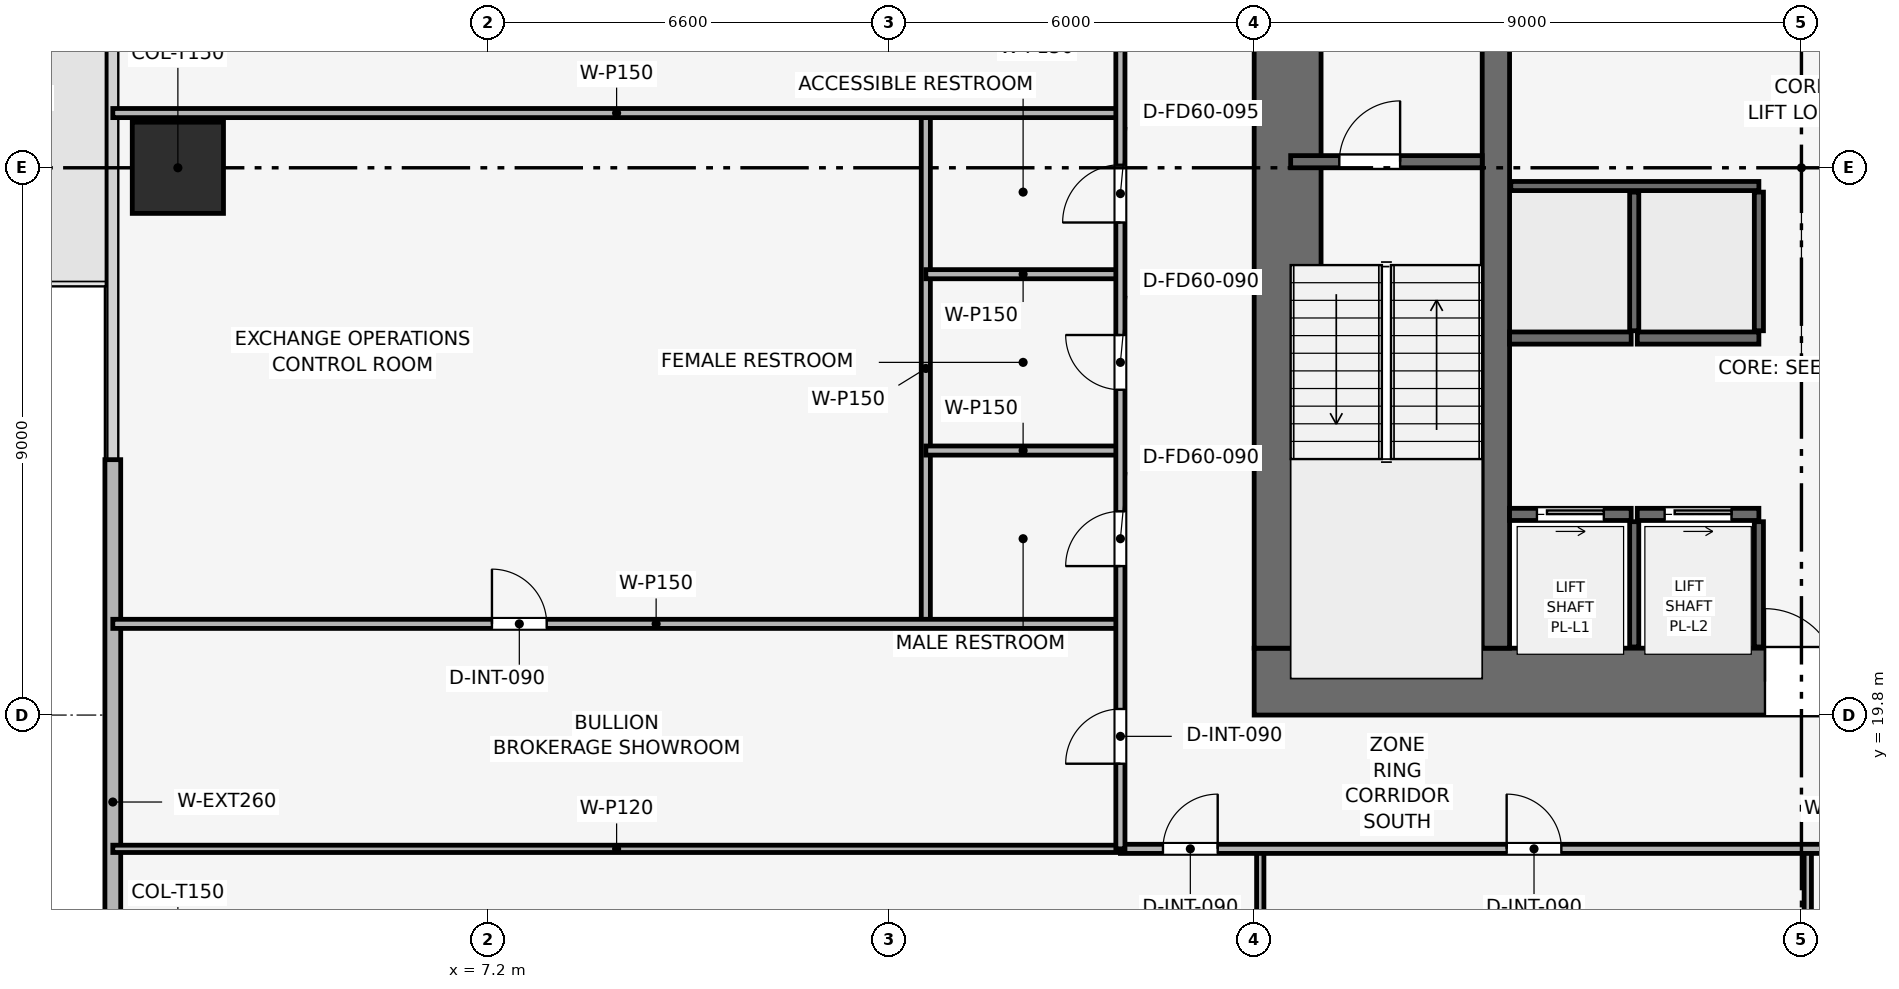
"""IFC4 building model, lengths in metres.
Left out: names, types, materials, properties, quantities, classifications, styles, units other than length and angle.
Written with IfcOpenShell. Run it as: python <this file> out.ifc"""

import sys

from ifc_helpers import new_model, si_unit, direction, frame, frame_2d, origin, origin_2d, place, context, subcontext, project, spatial, rectangle, extrude, element, fill, save


model = new_model("IFC4")
c1 = context("Model", 3, precision=1e-05, world=origin(), true_north=direction((0.0, 1.0)))
c2 = subcontext(c1, "Body", "Model", "MODEL_VIEW")
j1 = project(units=[si_unit("LENGTHUNIT", "METRE"), si_unit("PLANEANGLEUNIT", "RADIAN")], contexts=[c1])
p1 = place(None, origin())
s1 = spatial("IfcSite", under=j1, at=p1, CompositionType="ELEMENT")
p2 = place(p1, origin())
s2 = spatial("IfcBuilding", under=s1, at=p2, CompositionType="ELEMENT")
p3 = place(p2, frame((0.0, 0.0, 76.8)))
s3 = spatial("IfcBuildingStorey", under=s2, at=p3, CompositionType="ELEMENT", Elevation=76.8)
p4 = place(p3, frame((19.8, 20.35, 0.0), z_axis=(0.0, 0.0, 1.0), x_axis=(1.0, 0.0, 0.0)))
e1 = element("IfcWall", 1, at=p4, inside=s3, PredefinedType="SHEAR", context=c2, shape_type="SweptSolid", body=[
    extrude(rectangle(XDim=18.0, YDim=1.1, at=frame_2d((9.0, 0.0))), origin(), (0.0, 0.0, 1.0), 3.9),
])
p5 = place(p4, frame((8.4, 0.0, 0.0)))
e2 = element("IfcOpeningElement", 2, at=p5, cuts=e1, PredefinedType="OPENING", context=c2, shape_type="SweptSolid", body=[
    extrude(rectangle(XDim=1.2, YDim=2.2, at=frame_2d((0.6, 1.1))), frame((0.0, 0.56, 0.0), z_axis=(0.0, -1.0, 0.0), x_axis=(1.0, 0.0, 0.0)), (0.0, 0.0, 1.0), 1.12),
])
p6 = place(p3, frame((20.35, 20.9, 0.0), z_axis=(0.0, 0.0, 1.0), x_axis=(0.0, 1.0, 0.0)))
e3 = element("IfcWall", 3, at=p6, inside=s3, PredefinedType="SHEAR", context=c2, shape_type="SweptSolid", body=[
    extrude(rectangle(XDim=15.8, YDim=1.1, at=frame_2d((7.9, 0.0))), origin(), (0.0, 0.0, 1.0), 3.9),
])
p7 = place(p6, frame((9.9, 0.0, 0.0)))
e4 = element("IfcOpeningElement", 4, at=p7, cuts=e3, PredefinedType="OPENING", context=c2, shape_type="SweptSolid", body=[
    extrude(rectangle(XDim=1.1, YDim=2.15, at=frame_2d((0.55, 1.075))), frame((0.0, 0.56, 0.0), z_axis=(0.0, -1.0, 0.0), x_axis=(1.0, 0.0, 0.0)), (0.0, 0.0, 1.0), 1.12),
])
p8 = place(p3, frame((23.775, 20.9, 0.0), z_axis=(0.0, 0.0, 1.0), x_axis=(0.0, 1.0, 0.0)))
e5 = element("IfcWall", 5, at=p8, inside=s3, PredefinedType="SHEAR", context=c2, shape_type="SweptSolid", body=[
    extrude(rectangle(XDim=15.8, YDim=0.45, at=frame_2d((7.9, 0.0))), origin(), (0.0, 0.0, 1.0), 3.9),
])
p9 = place(p3, frame((2.1, 28.8, 0.003), z_axis=(0.0, 0.0, 1.0), x_axis=(1.0, 0.0, 0.0)))
e6 = element("IfcColumn", 6, at=p9, inside=s3, PredefinedType="COLUMN", context=c2, shape_type="SweptSolid", body=[
    extrude(rectangle(XDim=1.5, YDim=1.5, at=origin_2d()), origin(), (0.0, 0.0, 1.0), 3.644),
])
p10 = place(p3, frame((1.03, 8.7, 0.0), z_axis=(0.0, 0.0, 1.0), x_axis=(0.0, 1.0, 0.0)))
e7 = element("IfcWall", 7, at=p10, inside=s3, PredefinedType="SOLIDWALL", context=c2, shape_type="SweptSolid", body=[
    extrude(rectangle(XDim=15.3, YDim=0.26, at=frame_2d((7.65, 0.0))), origin(), (0.0, 0.0, 1.0), 3.65),
])
p11 = place(p10, frame((0.25, 0.0, 0.9)))
e8 = element("IfcOpeningElement", 8, at=p11, cuts=e7, PredefinedType="OPENING", context=c2, shape_type="SweptSolid", body=[
    extrude(rectangle(XDim=3.8, YDim=1.9, at=frame_2d((1.9, 0.95))), frame((0.0, 0.14, 0.0), z_axis=(0.0, -1.0, 0.0), x_axis=(1.0, 0.0, 0.0)), (0.0, 0.0, 1.0), 0.28),
])
p12 = place(p3, frame((20.4, 28.9, 0.0), z_axis=(0.0, 0.0, 1.0), x_axis=(1.0, 0.0, 0.0)))
e9 = element("IfcWall", 9, at=p12, inside=s3, PredefinedType="SHEAR", context=c2, shape_type="SweptSolid", body=[
    extrude(rectangle(XDim=3.15, YDim=0.2, at=frame_2d((1.575, 0.0))), origin(), (0.0, 0.0, 1.0), 3.65),
])
p13 = place(p12, frame((0.8, 0.0, 0.0)))
e10 = element("IfcOpeningElement", 10, at=p13, cuts=e9, PredefinedType="OPENING", context=c2, shape_type="SweptSolid", body=[
    extrude(rectangle(XDim=1.0, YDim=2.1, at=frame_2d((0.5, 1.05))), frame((0.0, 0.11, 0.0), z_axis=(0.0, -1.0, 0.0), x_axis=(1.0, 0.0, 0.0)), (0.0, 0.0, 1.0), 0.22),
])
p14 = place(p3, frame((24.0, 23.1, 0.0), z_axis=(0.0, 0.0, 1.0), x_axis=(1.0, 0.0, 0.0)))
e11 = element("IfcWall", 11, at=p14, inside=s3, PredefinedType="SHEAR", context=c2, shape_type="SweptSolid", body=[
    extrude(rectangle(XDim=2.0, YDim=0.2, at=frame_2d((1.0, 0.0))), origin(), (0.0, 0.0, 1.0), 3.65),
])
p15 = place(p14, frame((0.45, 0.0, 0.0)))
e12 = element("IfcOpeningElement", 12, at=p15, cuts=e11, PredefinedType="OPENING", context=c2, shape_type="SweptSolid", body=[
    extrude(rectangle(XDim=1.1, YDim=2.15, at=frame_2d((0.55, 1.075))), frame((0.0, 0.11, 0.0), z_axis=(0.0, -1.0, 0.0), x_axis=(1.0, 0.0, 0.0)), (0.0, 0.0, 1.0), 0.22),
])
p16 = place(p3, frame((26.1, 23.1, 0.0), z_axis=(0.0, 0.0, 1.0), x_axis=(1.0, 0.0, 0.0)))
e13 = element("IfcWall", 13, at=p16, inside=s3, PredefinedType="SHEAR", context=c2, shape_type="SweptSolid", body=[
    extrude(rectangle(XDim=2.0, YDim=0.2, at=frame_2d((1.0, 0.0))), origin(), (0.0, 0.0, 1.0), 3.65),
])
p17 = place(p16, frame((0.45, 0.0, 0.0)))
e14 = element("IfcOpeningElement", 14, at=p17, cuts=e13, PredefinedType="OPENING", context=c2, shape_type="SweptSolid", body=[
    extrude(rectangle(XDim=1.1, YDim=2.15, at=frame_2d((0.55, 1.075))), frame((0.0, 0.11, 0.0), z_axis=(0.0, -1.0, 0.0), x_axis=(1.0, 0.0, 0.0)), (0.0, 0.0, 1.0), 0.22),
])
for number, where, z_axis, x_axis in (
    (15, (24.0, 26.0, 0.0), (0.0, 0.0, 1.0), (1.0, 0.0, 0.0)),
    (16, (26.1, 26.0, 0.0), (0.0, 0.0, 1.0), (1.0, 0.0, 0.0)),
):
    element("IfcWall", number, at=place(p3, frame(where, z_axis=z_axis, x_axis=x_axis)), inside=s3, PredefinedType="SHEAR", context=c2, shape_type="SweptSolid", body=[
        extrude(rectangle(XDim=2.0, YDim=0.2, at=frame_2d((1.0, 0.0))), origin(), (0.0, 0.0, 1.0), 3.65),
    ])
for number, where, z_axis, x_axis in (
    (17, (26.05, 20.92, 0.0), (0.0, 0.0, 1.0), (0.0, 1.0, 0.0)),
    (18, (28.1, 20.92, 0.0), (0.0, 0.0, 1.0), (0.0, 1.0, 0.0)),
):
    element("IfcWall", number, at=place(p3, frame(where, z_axis=z_axis, x_axis=x_axis)), inside=s3, PredefinedType="SHEAR", context=c2, shape_type="SweptSolid", body=[
        extrude(rectangle(XDim=2.06, YDim=0.15, at=frame_2d((1.03, 0.0))), origin(), (0.0, 0.0, 1.0), 3.65),
    ])
p18 = place(p3, frame((24.02, 28.5, 0.0), z_axis=(0.0, 0.0, 1.0), x_axis=(1.0, 0.0, 0.0)))
e19 = element("IfcWall", 19, at=p18, inside=s3, PredefinedType="SHEAR", context=c2, shape_type="SweptSolid", body=[
    extrude(rectangle(XDim=4.08, YDim=0.15, at=frame_2d((2.04, 0.0))), origin(), (0.0, 0.0, 1.0), 3.65),
])
for number, where, z_axis, x_axis in (
    (20, (26.05, 26.12, 0.0), (0.0, 0.0, 1.0), (0.0, 1.0, 0.0)),
    (21, (28.1, 26.12, 0.0), (0.0, 0.0, 1.0), (0.0, 1.0, 0.0)),
):
    element("IfcWall", number, at=place(p3, frame(where, z_axis=z_axis, x_axis=x_axis)), inside=s3, PredefinedType="SHEAR", context=c2, shape_type="SweptSolid", body=[
        extrude(rectangle(XDim=2.28, YDim=0.15, at=frame_2d((1.14, 0.0))), origin(), (0.0, 0.0, 1.0), 3.65),
    ])
p19 = place(p3, frame((19.9, 1.03, 0.0), z_axis=(0.0, 0.0, 1.0), x_axis=(0.0, 1.0, 0.0)))
e22 = element("IfcWall", 22, at=p19, inside=s3, PredefinedType="PARTITIONING", context=c2, shape_type="SweptSolid", body=[
    extrude(rectangle(XDim=16.57, YDim=0.12, at=frame_2d((8.285, 0.0))), origin(), (0.0, 0.0, 1.0), 2.935),
])
p20 = place(p3, frame((28.904, 1.03, 0.0), z_axis=(0.0, 0.0, 1.0), x_axis=(0.0, 1.0, 0.0)))
e23 = element("IfcWall", 23, at=p20, inside=s3, PredefinedType="PARTITIONING", context=c2, shape_type="SweptSolid", body=[
    extrude(rectangle(XDim=16.57, YDim=0.12, at=frame_2d((8.285, 0.0))), origin(), (0.0, 0.0, 1.0), 3.085),
])
p21 = place(p3, frame((1.03, 17.6, 0.0), z_axis=(0.0, 0.0, 1.0), x_axis=(1.0, 0.0, 0.0)))
e24 = element("IfcWall", 24, at=p21, inside=s3, PredefinedType="PARTITIONING", context=c2, shape_type="SweptSolid", body=[
    extrude(rectangle(XDim=16.57, YDim=0.12, at=frame_2d((8.285, 0.0))), origin(), (0.0, 0.0, 1.0), 2.935),
])
p22 = place(p3, frame((14.4, 21.3, 0.0), z_axis=(0.0, 0.0, 1.0), x_axis=(0.0, 1.0, 0.0)))
e25 = element("IfcWall", 25, at=p22, inside=s3, PredefinedType="PARTITIONING", context=c2, shape_type="SweptSolid", body=[
    extrude(rectangle(XDim=8.4, YDim=0.15, at=frame_2d((4.2, 0.0))), origin(), (0.0, 0.0, 1.0), 3.085),
])
p23 = place(p3, frame((1.03, 21.3, 0.0), z_axis=(0.0, 0.0, 1.0), x_axis=(1.0, 0.0, 0.0)))
e26 = element("IfcWall", 26, at=p23, inside=s3, PredefinedType="PARTITIONING", context=c2, shape_type="SweptSolid", body=[
    extrude(rectangle(XDim=16.57, YDim=0.15, at=frame_2d((8.285, 0.0))), origin(), (0.0, 0.0, 1.0), 2.935),
])
p24 = place(p23, frame((6.235, 0.0, 0.0)))
e27 = element("IfcOpeningElement", 27, at=p24, cuts=e26, PredefinedType="OPENING", context=c2, shape_type="SweptSolid", body=[
    extrude(rectangle(XDim=0.9, YDim=2.1, at=frame_2d((0.45, 1.05))), frame((0.0, 0.085, 0.0), z_axis=(0.0, -1.0, 0.0), x_axis=(1.0, 0.0, 0.0)), (0.0, 0.0, 1.0), 0.17),
])
p25 = place(p3, frame((1.03, 29.7, 0.0), z_axis=(0.0, 0.0, 1.0), x_axis=(1.0, 0.0, 0.0)))
e28 = element("IfcWall", 28, at=p25, inside=s3, PredefinedType="PARTITIONING", context=c2, shape_type="SweptSolid", body=[
    extrude(rectangle(XDim=16.57, YDim=0.15, at=frame_2d((8.285, 0.0))), origin(), (0.0, 0.0, 1.0), 2.935),
])
for number, where, z_axis, x_axis in (
    (29, (14.4, 24.15, 0.0), (0.0, 0.0, 1.0), (1.0, 0.0, 0.0)),
    (30, (14.4, 27.05, 0.0), (0.0, 0.0, 1.0), (1.0, 0.0, 0.0)),
):
    element("IfcWall", number, at=place(p3, frame(where, z_axis=z_axis, x_axis=x_axis)), inside=s3, PredefinedType="PARTITIONING", context=c2, shape_type="SweptSolid", body=[
        extrude(rectangle(XDim=3.2, YDim=0.15, at=frame_2d((1.6, 0.0))), origin(), (0.0, 0.0, 1.0), 3.65),
    ])
p26 = place(p3, frame((17.6, 17.6, 0.0), z_axis=(0.0, 0.0, 1.0), x_axis=(1.0, 0.0, 0.0)))
e31 = element("IfcWall", 31, at=p26, inside=s3, PredefinedType="PARTITIONING", context=c2, shape_type="SweptSolid", body=[
    extrude(rectangle(XDim=22.4, YDim=0.15, at=frame_2d((11.2, 0.0))), origin(), (0.0, 0.0, 1.0), 3.085),
])
p27 = place(p26, frame((0.7, 0.0, 0.0)))
e32 = element("IfcOpeningElement", 32, at=p27, cuts=e31, PredefinedType="OPENING", context=c2, shape_type="SweptSolid", body=[
    extrude(rectangle(XDim=0.9, YDim=2.1, at=frame_2d((0.45, 1.05))), frame((0.0, 0.085, 0.0), z_axis=(0.0, -1.0, 0.0), x_axis=(1.0, 0.0, 0.0)), (0.0, 0.0, 1.0), 0.17),
])
p28 = place(p26, frame((6.352, 0.0, 0.0)))
e33 = element("IfcOpeningElement", 33, at=p28, cuts=e31, PredefinedType="OPENING", context=c2, shape_type="SweptSolid", body=[
    extrude(rectangle(XDim=0.9, YDim=2.1, at=frame_2d((0.45, 1.05))), frame((0.0, 0.085, 0.0), z_axis=(0.0, -1.0, 0.0), x_axis=(1.0, 0.0, 0.0)), (0.0, 0.0, 1.0), 0.17),
])
p29 = place(p26, frame((16.402, 0.0, 0.0)))
e34 = element("IfcOpeningElement", 34, at=p29, cuts=e31, PredefinedType="OPENING", context=c2, shape_type="SweptSolid", body=[
    extrude(rectangle(XDim=0.9, YDim=2.1, at=frame_2d((0.45, 1.05))), frame((0.0, 0.085, 0.0), z_axis=(0.0, -1.0, 0.0), x_axis=(1.0, 0.0, 0.0)), (0.0, 0.0, 1.0), 0.17),
])
p30 = place(p3, frame((17.6, 17.6, 0.0), z_axis=(0.0, 0.0, 1.0), x_axis=(0.0, 1.0, 0.0)))
e35 = element("IfcWall", 35, at=p30, inside=s3, PredefinedType="PARTITIONING", context=c2, shape_type="SweptSolid", body=[
    extrude(rectangle(XDim=22.4, YDim=0.15, at=frame_2d((11.2, 0.0))), origin(), (0.0, 0.0, 1.0), 3.085),
])
p31 = place(p30, frame((1.4, 0.0, 0.0)))
e36 = element("IfcOpeningElement", 36, at=p31, cuts=e35, PredefinedType="OPENING", context=c2, shape_type="SweptSolid", body=[
    extrude(rectangle(XDim=0.9, YDim=2.1, at=frame_2d((0.45, 1.05))), frame((0.0, 0.085, 0.0), z_axis=(0.0, -1.0, 0.0), x_axis=(1.0, 0.0, 0.0)), (0.0, 0.0, 1.0), 0.17),
])
p32 = place(p30, frame((4.65, 0.0, 0.0)))
e37 = element("IfcOpeningElement", 37, at=p32, cuts=e35, PredefinedType="OPENING", context=c2, shape_type="SweptSolid", body=[
    extrude(rectangle(XDim=0.9, YDim=2.1, at=frame_2d((0.45, 1.05))), frame((0.0, 0.085, 0.0), z_axis=(0.0, -1.0, 0.0), x_axis=(1.0, 0.0, 0.0)), (0.0, 0.0, 1.0), 0.17),
])
p33 = place(p30, frame((7.55, 0.0, 0.0)))
e38 = element("IfcOpeningElement", 38, at=p33, cuts=e35, PredefinedType="OPENING", context=c2, shape_type="SweptSolid", body=[
    extrude(rectangle(XDim=0.9, YDim=2.1, at=frame_2d((0.45, 1.05))), frame((0.0, 0.085, 0.0), z_axis=(0.0, -1.0, 0.0), x_axis=(1.0, 0.0, 0.0)), (0.0, 0.0, 1.0), 0.17),
])
p34 = place(p30, frame((10.3, 0.0, 0.0)))
e39 = element("IfcOpeningElement", 39, at=p34, cuts=e35, PredefinedType="OPENING", context=c2, shape_type="SweptSolid", body=[
    extrude(rectangle(XDim=0.95, YDim=2.1, at=frame_2d((0.475, 1.05))), frame((0.0, 0.085, 0.0), z_axis=(0.0, -1.0, 0.0), x_axis=(1.0, 0.0, 0.0)), (0.0, 0.0, 1.0), 0.17),
])
p35 = place(p30, frame((16.8, 0.0, 0.0)))
e40 = element("IfcOpeningElement", 40, at=p35, cuts=e35, PredefinedType="OPENING", context=c2, shape_type="SweptSolid", body=[
    extrude(rectangle(XDim=0.9, YDim=2.1, at=frame_2d((0.45, 1.05))), frame((0.0, 0.085, 0.0), z_axis=(0.0, -1.0, 0.0), x_axis=(1.0, 0.0, 0.0)), (0.0, 0.0, 1.0), 0.17),
])
p36 = place(p13, origin())
e41 = element("IfcDoor", 41, at=p36, inside=s3, OperationType="SINGLE_SWING_RIGHT", PredefinedType="DOOR", context=c2, shape_type="SweptSolid", body=[
    extrude(rectangle(XDim=1.0, YDim=2.1, at=frame_2d((0.5, 1.05))), frame((0.0, 0.025, 0.0), z_axis=(0.0, -1.0, 0.0), x_axis=(1.0, 0.0, 0.0)), (0.0, 0.0, 1.0), 0.05),
])
fill(e10, e41)
p37 = place(p15, origin())
e42 = element("IfcDoor", 42, at=p37, inside=s3, OperationType="SLIDING_TO_RIGHT", PredefinedType="DOOR", context=c2, shape_type="SweptSolid", body=[
    extrude(rectangle(XDim=1.1, YDim=2.15, at=frame_2d((0.55, 1.075))), frame((0.0, 0.025, 0.0), z_axis=(0.0, -1.0, 0.0), x_axis=(1.0, 0.0, 0.0)), (0.0, 0.0, 1.0), 0.05),
])
fill(e12, e42)
p38 = place(p17, origin())
e43 = element("IfcDoor", 43, at=p38, inside=s3, OperationType="SLIDING_TO_RIGHT", PredefinedType="DOOR", context=c2, shape_type="SweptSolid", body=[
    extrude(rectangle(XDim=1.1, YDim=2.15, at=frame_2d((0.55, 1.075))), frame((0.0, 0.025, 0.0), z_axis=(0.0, -1.0, 0.0), x_axis=(1.0, 0.0, 0.0)), (0.0, 0.0, 1.0), 0.05),
])
fill(e14, e43)
p39 = place(p24, origin())
e44 = element("IfcDoor", 44, at=p39, inside=s3, OperationType="SINGLE_SWING_LEFT", PredefinedType="DOOR", context=c2, shape_type="SweptSolid", body=[
    extrude(rectangle(XDim=0.9, YDim=2.1, at=frame_2d((0.45, 1.05))), frame((0.0, 0.025, 0.0), z_axis=(0.0, -1.0, 0.0), x_axis=(1.0, 0.0, 0.0)), (0.0, 0.0, 1.0), 0.05),
])
fill(e27, e44)
p40 = place(p27, origin())
e45 = element("IfcDoor", 45, at=p40, inside=s3, OperationType="SINGLE_SWING_RIGHT", PredefinedType="DOOR", context=c2, shape_type="SweptSolid", body=[
    extrude(rectangle(XDim=0.9, YDim=2.1, at=frame_2d((0.45, 1.05))), frame((0.0, 0.025, 0.0), z_axis=(0.0, -1.0, 0.0), x_axis=(1.0, 0.0, 0.0)), (0.0, 0.0, 1.0), 0.05),
])
fill(e32, e45)
p41 = place(p28, origin())
e46 = element("IfcDoor", 46, at=p41, inside=s3, OperationType="SINGLE_SWING_LEFT", PredefinedType="DOOR", context=c2, shape_type="SweptSolid", body=[
    extrude(rectangle(XDim=0.9, YDim=2.1, at=frame_2d((0.45, 1.05))), frame((0.0, 0.025, 0.0), z_axis=(0.0, -1.0, 0.0), x_axis=(1.0, 0.0, 0.0)), (0.0, 0.0, 1.0), 0.05),
])
fill(e33, e46)
p42 = place(p31, origin())
e47 = element("IfcDoor", 47, at=p42, inside=s3, OperationType="SINGLE_SWING_LEFT", PredefinedType="DOOR", context=c2, shape_type="SweptSolid", body=[
    extrude(rectangle(XDim=0.9, YDim=2.1, at=frame_2d((0.45, 1.05))), frame((0.0, 0.025, 0.0), z_axis=(0.0, -1.0, 0.0), x_axis=(1.0, 0.0, 0.0)), (0.0, 0.0, 1.0), 0.05),
])
fill(e36, e47)
p43 = place(p32, origin())
e48 = element("IfcDoor", 48, at=p43, inside=s3, OperationType="SINGLE_SWING_LEFT", PredefinedType="DOOR", context=c2, shape_type="SweptSolid", body=[
    extrude(rectangle(XDim=0.9, YDim=2.1, at=frame_2d((0.45, 1.05))), frame((0.0, 0.025, 0.0), z_axis=(0.0, -1.0, 0.0), x_axis=(1.0, 0.0, 0.0)), (0.0, 0.0, 1.0), 0.05),
])
fill(e37, e48)
p44 = place(p33, origin())
e49 = element("IfcDoor", 49, at=p44, inside=s3, OperationType="SINGLE_SWING_RIGHT", PredefinedType="DOOR", context=c2, shape_type="SweptSolid", body=[
    extrude(rectangle(XDim=0.9, YDim=2.1, at=frame_2d((0.45, 1.05))), frame((0.0, 0.025, 0.0), z_axis=(0.0, -1.0, 0.0), x_axis=(1.0, 0.0, 0.0)), (0.0, 0.0, 1.0), 0.05),
])
fill(e38, e49)
p45 = place(p34, origin())
e50 = element("IfcDoor", 50, at=p45, inside=s3, OperationType="SINGLE_SWING_LEFT", PredefinedType="DOOR", context=c2, shape_type="SweptSolid", body=[
    extrude(rectangle(XDim=0.95, YDim=2.1, at=frame_2d((0.475, 1.05))), frame((0.0, 0.025, 0.0), z_axis=(0.0, -1.0, 0.0), x_axis=(1.0, 0.0, 0.0)), (0.0, 0.0, 1.0), 0.05),
])
fill(e39, e50)
p46 = place(p5, origin())
e51 = element("IfcDoor", 51, at=p46, inside=s3, OperationType="SINGLE_SWING_LEFT", PredefinedType="DOOR", context=c2, shape_type="SweptSolid", body=[
    extrude(rectangle(XDim=1.2, YDim=2.2, at=frame_2d((0.6, 1.1))), frame((0.0, 0.025, 0.0), z_axis=(0.0, -1.0, 0.0), x_axis=(1.0, 0.0, 0.0)), (0.0, 0.0, 1.0), 0.05),
])
fill(e2, e51)
save(model, sys.argv[1])
